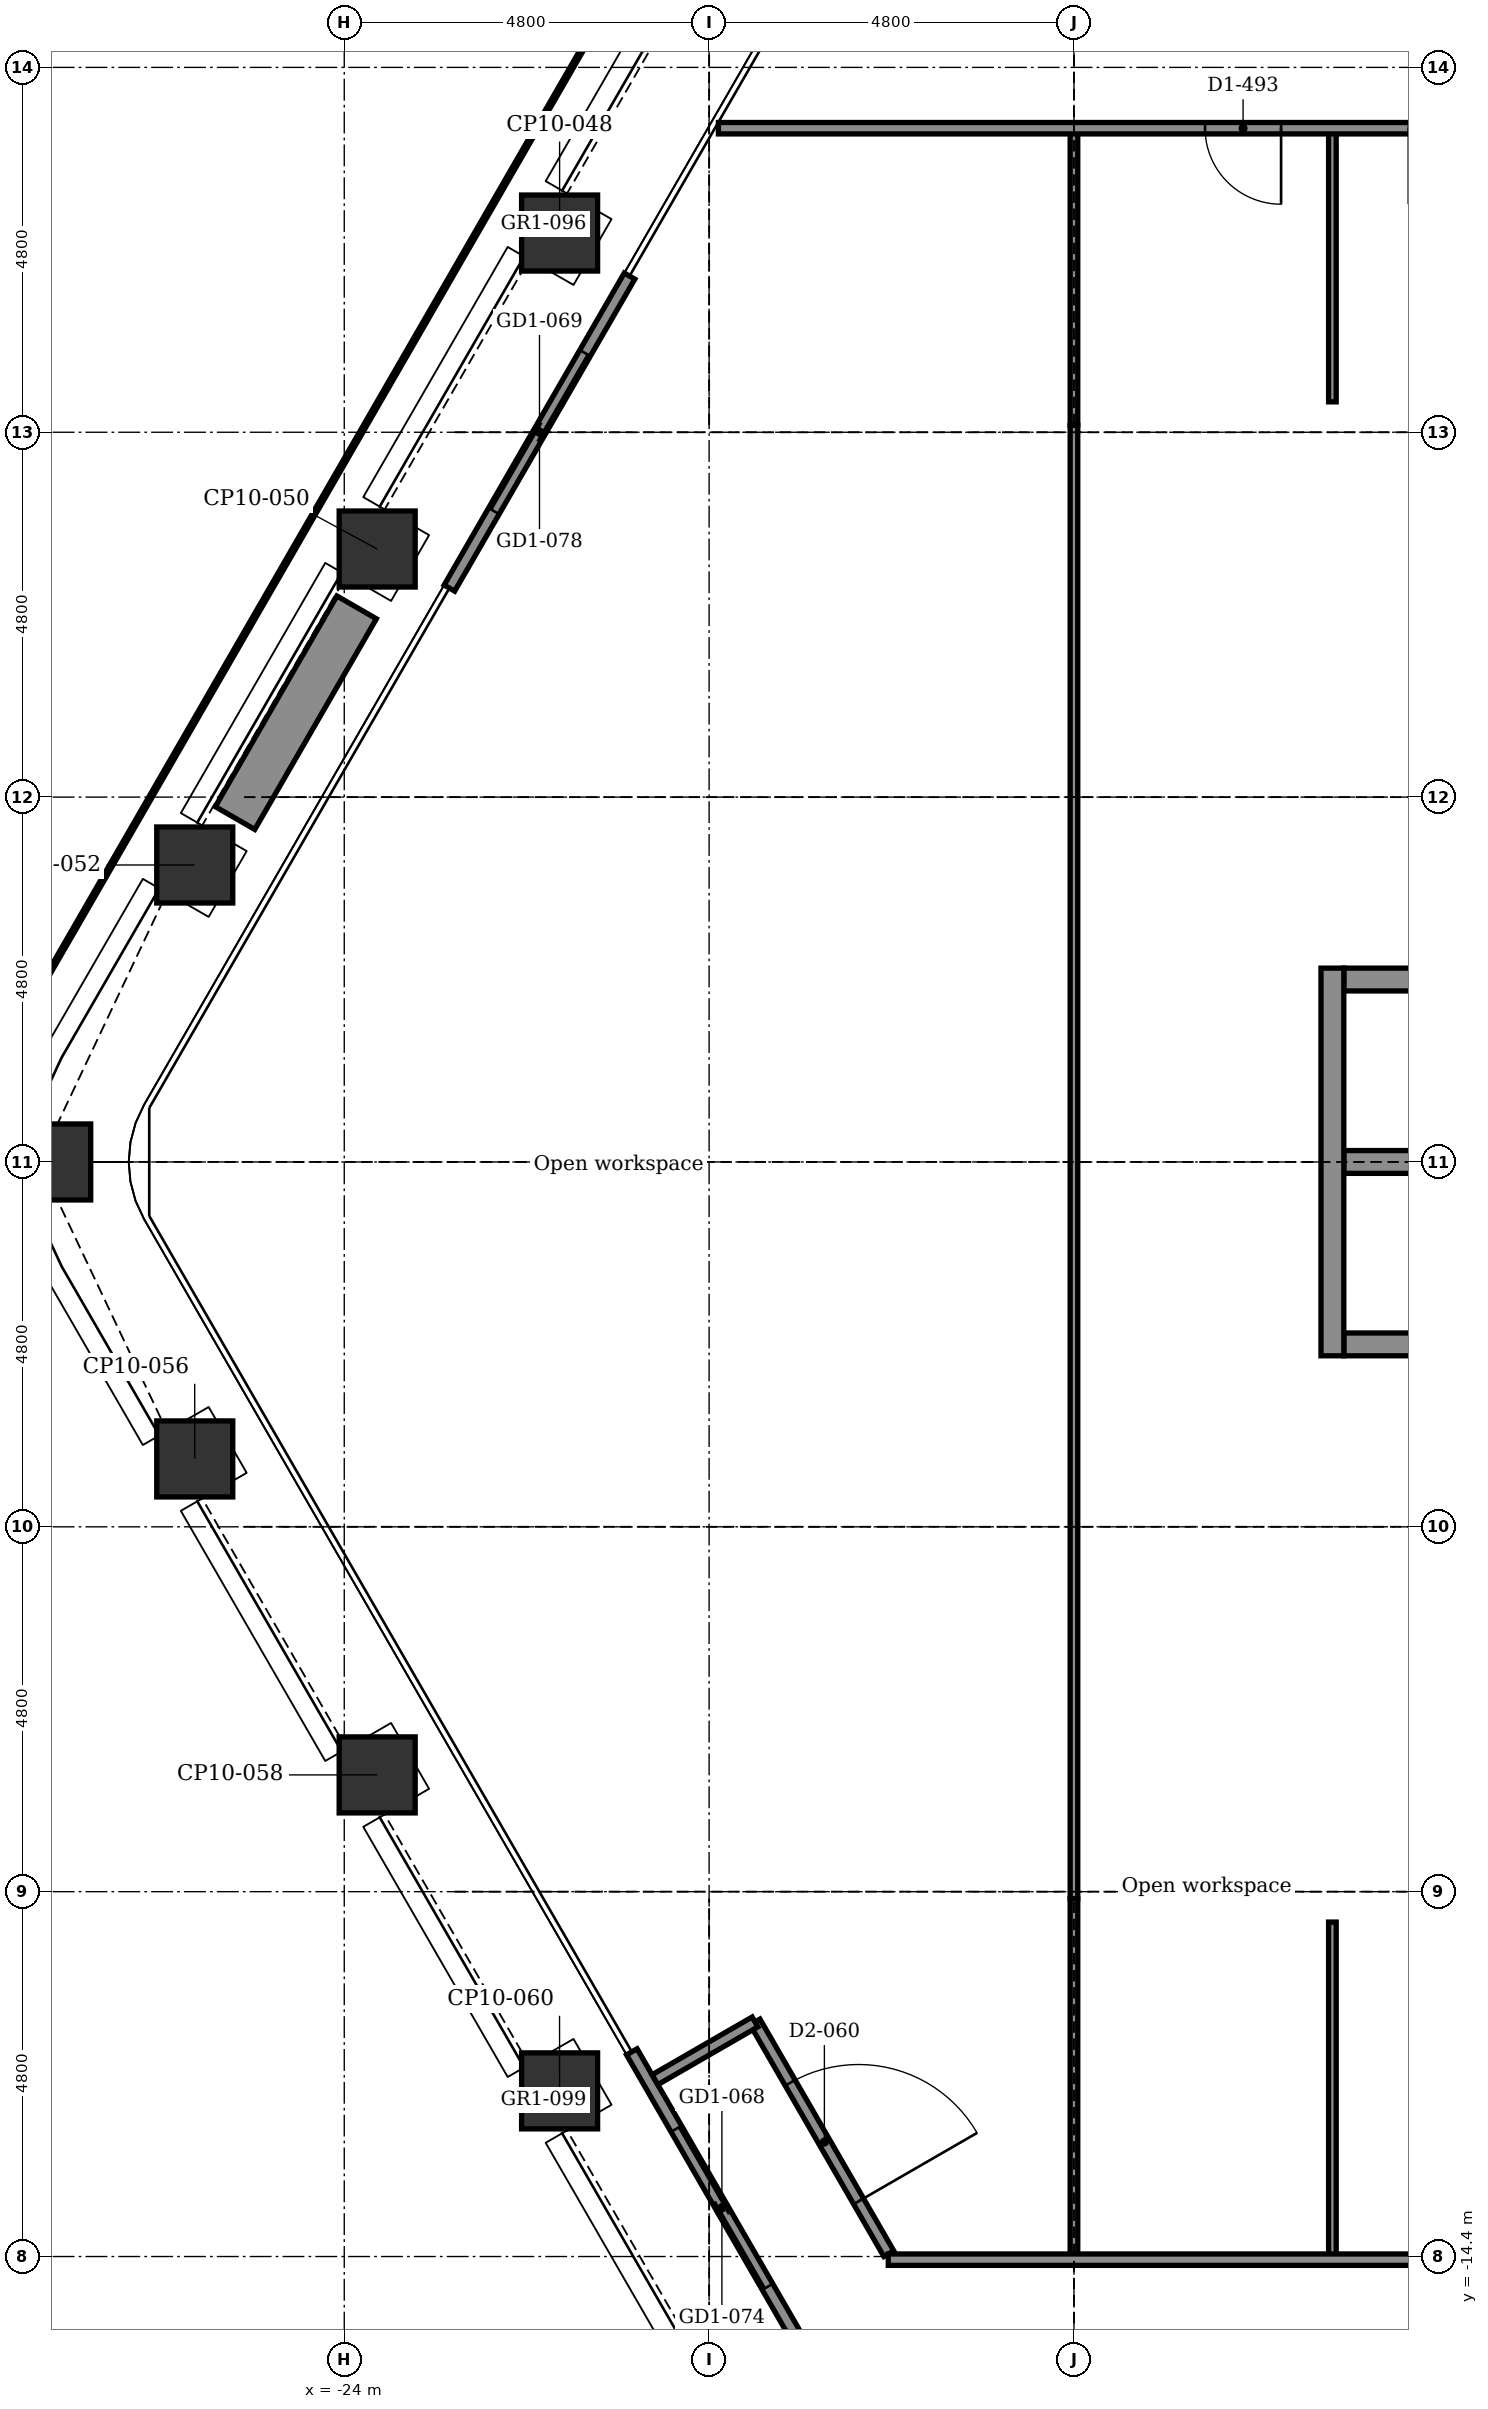
"""IFC4 building model, lengths in metres.
Left out: names, types, materials, properties, quantities, classifications, styles, units other than length and angle.
Written with IfcOpenShell. Run it as: python <this file> out.ifc"""

import sys

from ifc_helpers import new_model, si_unit, direction, frame, frame_2d, origin, origin_2d, place, context, subcontext, project, spatial, rectangle, extrude, element, fill, save


model = new_model("IFC4")
c1 = context("Model", 3, precision=1e-05, world=origin(), true_north=direction((0.0, 1.0)))
c2 = subcontext(c1, "Body", "Model", "MODEL_VIEW")
j1 = project(units=[si_unit("LENGTHUNIT", "METRE"), si_unit("PLANEANGLEUNIT", "RADIAN")], contexts=[c1])
p1 = place(None, origin())
s1 = spatial("IfcSite", under=j1, at=p1, CompositionType="ELEMENT")
p2 = place(p1, origin())
s2 = spatial("IfcBuilding", under=s1, at=p2, CompositionType="ELEMENT")
p3 = place(p2, frame((0.0, 0.0, 201.2)))
s3 = spatial("IfcBuildingStorey", under=s2, at=p3, CompositionType="ELEMENT", Elevation=201.2)
for number, where, z_axis, x_axis in (
    (1, (-21.167, -12.221, -0.15), (0.0, 0.0, 1.0), (0.866, 0.5, 0.0)),
    (2, (-23.567, -8.064, -0.15), (0.0, 0.0, 1.0), (0.866, 0.5, 0.0)),
    (3, (-25.967, -3.907, -0.15), (0.0, 0.0, 1.0), (0.866, 0.5, 0.0)),
    (4, (-27.836, 0.0, -0.15), (0.0, 0.0, 1.0), (1.0, 0.0, 0.0)),
    (5, (-25.967, 3.907, -0.15), (0.0, 0.0, 1.0), (0.5, 0.866, 0.0)),
    (6, (-23.567, 8.064, -0.15), (0.0, 0.0, 1.0), (0.5, 0.866, 0.0)),
    (7, (-21.167, 12.221, -0.15), (0.0, 0.0, 1.0), (0.5, 0.866, 0.0)),
):
    element("IfcColumn", number, at=place(p3, frame(where, z_axis=z_axis, x_axis=x_axis)), inside=s3, PredefinedType="COLUMN", context=c2, shape_type="SweptSolid", body=[
        extrude(rectangle(XDim=1.0, YDim=1.0, at=origin_2d()), origin(), (0.0, 0.0, 1.0), 3.9),
    ])
p4 = place(p3, frame((-10.85, -2.4, -0.15), z_axis=(0.0, 0.0, 1.0), x_axis=(1.0, 0.0, 0.0)))
e8 = element("IfcWall", 8, at=p4, inside=s3, PredefinedType="STANDARD", context=c2, shape_type="SweptSolid", body=[
    extrude(rectangle(XDim=1.1, YDim=0.3, at=frame_2d((0.55, 0.0))), origin(), (0.0, 0.0, 1.0), 3.9),
])
p5 = place(p3, frame((-10.85, 0.0, -0.15), z_axis=(0.0, 0.0, 1.0), x_axis=(1.0, 0.0, 0.0)))
e9 = element("IfcWall", 9, at=p5, inside=s3, PredefinedType="STANDARD", context=c2, shape_type="SweptSolid", body=[
    extrude(rectangle(XDim=3.3, YDim=0.3, at=frame_2d((1.65, 0.0))), origin(), (0.0, 0.0, 1.0), 3.9),
])
p6 = place(p3, frame((-10.85, 2.4, -0.15), z_axis=(0.0, 0.0, 1.0), x_axis=(1.0, 0.0, 0.0)))
e10 = element("IfcWall", 10, at=p6, inside=s3, PredefinedType="STANDARD", context=c2, shape_type="SweptSolid", body=[
    extrude(rectangle(XDim=1.1, YDim=0.3, at=frame_2d((0.55, 0.0))), origin(), (0.0, 0.0, 1.0), 3.9),
])
p7 = place(p3, frame((-11.0, -2.55, -0.15), z_axis=(0.0, 0.0, 1.0), x_axis=(0.0, 1.0, 0.0)))
e11 = element("IfcWall", 11, at=p7, inside=s3, PredefinedType="STANDARD", context=c2, shape_type="SweptSolid", body=[
    extrude(rectangle(XDim=5.1, YDim=0.3, at=frame_2d((2.55, 0.0))), origin(), (0.0, 0.0, 1.0), 3.9),
])
p8 = place(p3, frame((-17.847, -15.812, 0.0), z_axis=(0.0, 0.0, 1.0), x_axis=(-0.5000167099, 0.866015756104, 0.0)))
e12 = element("IfcWall", 12, at=p8, inside=s3, PredefinedType="PARTITIONING", context=c2, shape_type="SweptSolid", body=[
    extrude(rectangle(XDim=4.74, YDim=0.16, at=frame_2d((2.37, 0.0))), origin(), (0.0, 0.0, 1.0), 3.75),
])
p9 = place(p8, frame((1.17, 0.0, 0.0)))
e13 = element("IfcOpeningElement", 13, at=p9, cuts=e12, PredefinedType="OPENING", context=c2, shape_type="SweptSolid", body=[
    extrude(rectangle(XDim=2.4, YDim=2.4, at=frame_2d((1.2, 1.2))), frame((0.0, 0.09, 0.0), z_axis=(0.0, -1.0, 0.0), x_axis=(1.0, 0.0, 0.0)), (0.0, 0.0, 1.0), 0.18),
])
p10 = place(p3, frame((-22.617, 7.55, 0.0), z_axis=(0.0, 0.0, 1.0), x_axis=(0.5000167099, 0.866015756104, 0.0)))
e14 = element("IfcWall", 14, at=p10, inside=s3, PredefinedType="PARTITIONING", context=c2, shape_type="SweptSolid", body=[
    extrude(rectangle(XDim=4.74, YDim=0.16, at=frame_2d((2.37, 0.0))), origin(), (0.0, 0.0, 1.0), 3.75),
])
p11 = place(p10, frame((1.17, 0.0, 0.0)))
e15 = element("IfcOpeningElement", 15, at=p11, cuts=e14, PredefinedType="OPENING", context=c2, shape_type="SweptSolid", body=[
    extrude(rectangle(XDim=2.4, YDim=2.4, at=frame_2d((1.2, 1.2))), frame((0.0, 0.09, 0.0), z_axis=(0.0, -1.0, 0.0), x_axis=(1.0, 0.0, 0.0)), (0.0, 0.0, 1.0), 0.18),
])
p12 = place(p3, frame((-25.437, 4.525, 0.0), z_axis=(0.0, 0.0, 1.0), x_axis=(0.499938187974, 0.866061088033, 0.0)))
e16 = element("IfcWall", 16, at=p12, inside=s3, PredefinedType="USERDEFINED", context=c2, shape_type="SweptSolid", body=[
    extrude(rectangle(XDim=3.2, YDim=0.6, at=frame_2d((1.6, 0.0))), origin(), (0.0, 0.0, 1.0), 0.7),
])
p13 = place(p3, frame((-11.0, -14.441, 0.0), z_axis=(0.0, 0.0, 1.0), x_axis=(0.0, 1.0, 0.0)))
e17 = element("IfcWall", 17, at=p13, inside=s3, PredefinedType="PARTITIONING", context=c2, shape_type="SweptSolid", body=[
    extrude(rectangle(XDim=4.441, YDim=0.1, at=frame_2d((2.221, 0.0))), origin(), (0.0, 0.0, 1.0), 3.75),
])
p14 = place(p3, frame((-11.0, 10.0, 0.0), z_axis=(0.0, 0.0, 1.0), x_axis=(0.0, 1.0, 0.0)))
e18 = element("IfcWall", 18, at=p14, inside=s3, PredefinedType="PARTITIONING", context=c2, shape_type="SweptSolid", body=[
    extrude(rectangle(XDim=3.6, YDim=0.1, at=frame_2d((1.8, 0.0))), origin(), (0.0, 0.0, 1.0), 3.75),
])
p15 = place(p3, frame((-14.4, -9.694, 0.0), z_axis=(0.0, 0.0, 1.0), x_axis=(0.0, 1.0, 0.0)))
e19 = element("IfcWall", 19, at=p15, inside=s3, PredefinedType="PARTITIONING", context=c2, shape_type="SweptSolid", body=[
    extrude(rectangle(XDim=19.387, YDim=0.1, at=frame_2d((9.694, 0.0))), origin(), (0.0, 0.0, 1.0), 3.75),
])
p16 = place(p3, frame((-14.4, -14.441, 0.0), z_axis=(0.0, 0.0, 1.0), x_axis=(0.0, 1.0, 0.0)))
e20 = element("IfcWall", 20, at=p16, inside=s3, PredefinedType="PARTITIONING", context=c2, shape_type="SweptSolid", body=[
    extrude(rectangle(XDim=4.748, YDim=0.1, at=frame_2d((2.374, 0.0))), origin(), (0.0, 0.0, 1.0), 3.066),
])
p17 = place(p3, frame((-14.4, 9.694, 0.0), z_axis=(0.0, 0.0, 1.0), x_axis=(0.0, 1.0, 0.0)))
e21 = element("IfcWall", 21, at=p17, inside=s3, PredefinedType="PARTITIONING", context=c2, shape_type="SweptSolid", body=[
    extrude(rectangle(XDim=3.906, YDim=0.1, at=frame_2d((1.953, 0.0))), origin(), (0.0, 0.0, 1.0), 3.066),
])
p18 = place(p3, frame((-18.596, -11.314, 0.0), z_axis=(0.0, 0.0, 1.0), x_axis=(0.499980607609, -0.866036599697, 0.0)))
e22 = element("IfcWall", 22, at=p18, inside=s3, PredefinedType="PARTITIONING", context=c2, shape_type="SweptSolid", body=[
    extrude(rectangle(XDim=3.52, YDim=0.15, at=frame_2d((1.76, 0.0))), origin(), (0.0, 0.0, 1.0), 3.75),
])
p19 = place(p18, frame((0.925, 0.0, 0.0)))
e23 = element("IfcOpeningElement", 23, at=p19, cuts=e22, PredefinedType="OPENING", context=c2, shape_type="SweptSolid", body=[
    extrude(rectangle(XDim=1.8, YDim=2.1, at=frame_2d((0.9, 1.05))), frame((0.0, 0.085, 0.0), z_axis=(0.0, -1.0, 0.0), x_axis=(1.0, 0.0, 0.0)), (0.0, 0.0, 1.0), 0.17),
])
p20 = place(p3, frame((-19.912, -12.074, 0.0), z_axis=(0.0, 0.0, 1.0), x_axis=(0.866030456496, 0.499991248344, 0.0)))
e24 = element("IfcWall", 24, at=p20, inside=s3, PredefinedType="PARTITIONING", context=c2, shape_type="SweptSolid", body=[
    extrude(rectangle(XDim=1.52, YDim=0.15, at=frame_2d((0.76, 0.0))), origin(), (0.0, 0.0, 1.0), 3.75),
])
p21 = place(p3, frame((-16.843, -14.441, 0.0), z_axis=(0.0, 0.0, 1.0), x_axis=(1.0, 0.0, 0.0)))
e25 = element("IfcWall", 25, at=p21, inside=s3, PredefinedType="PARTITIONING", context=c2, shape_type="SweptSolid", body=[
    extrude(rectangle(XDim=19.843, YDim=0.15, at=frame_2d((9.921, 0.0))), origin(), (0.0, 0.0, 1.0), 3.75),
])
p22 = place(p21, frame((8.493, 0.0, 0.0)))
e26 = element("IfcOpeningElement", 26, at=p22, cuts=e25, PredefinedType="OPENING", context=c2, shape_type="SweptSolid", body=[
    extrude(rectangle(XDim=0.9, YDim=2.1, at=frame_2d((0.45, 1.05))), frame((0.0, 0.085, 0.0), z_axis=(0.0, -1.0, 0.0), x_axis=(1.0, 0.0, 0.0)), (0.0, 0.0, 1.0), 0.17),
])
p23 = place(p21, frame((13.993, 0.0, 0.0)))
e27 = element("IfcOpeningElement", 27, at=p23, cuts=e25, PredefinedType="OPENING", context=c2, shape_type="SweptSolid", body=[
    extrude(rectangle(XDim=0.9, YDim=2.1, at=frame_2d((0.45, 1.05))), frame((0.0, 0.085, 0.0), z_axis=(0.0, -1.0, 0.0), x_axis=(1.0, 0.0, 0.0)), (0.0, 0.0, 1.0), 0.17),
])
p24 = place(p3, frame((-19.077, 13.6, 0.0), z_axis=(0.0, 0.0, 1.0), x_axis=(1.0, 0.0, 0.0)))
e28 = element("IfcWall", 28, at=p24, inside=s3, PredefinedType="PARTITIONING", context=c2, shape_type="SweptSolid", body=[
    extrude(rectangle(XDim=13.677, YDim=0.15, at=frame_2d((6.839, 0.0))), origin(), (0.0, 0.0, 1.0), 3.75),
])
p25 = place(p24, frame((9.083, 0.0, 0.0)))
e29 = element("IfcOpeningElement", 29, at=p25, cuts=e28, PredefinedType="OPENING", context=c2, shape_type="SweptSolid", body=[
    extrude(rectangle(XDim=1.0, YDim=2.1, at=frame_2d((0.5, 1.05))), frame((0.0, 0.085, 0.0), z_axis=(0.0, -1.0, 0.0), x_axis=(1.0, 0.0, 0.0)), (0.0, 0.0, 1.0), 0.17),
])
p26 = place(p24, frame((6.402, 0.0, 0.0)))
e30 = element("IfcOpeningElement", 30, at=p26, cuts=e28, PredefinedType="OPENING", context=c2, shape_type="SweptSolid", body=[
    extrude(rectangle(XDim=1.0, YDim=2.1, at=frame_2d((0.5, 1.05))), frame((0.0, 0.085, 0.0), z_axis=(0.0, -1.0, 0.0), x_axis=(1.0, 0.0, 0.0)), (0.0, 0.0, 1.0), 0.17),
])
p27 = place(p9, origin())
e31 = element("IfcDoor", 31, at=p27, inside=s3, OperationType="DOUBLE_DOOR_SLIDING", PredefinedType="DOOR", context=c2, shape_type="SweptSolid", body=[
    extrude(rectangle(XDim=2.4, YDim=2.4, at=frame_2d((1.2, 1.2))), frame((0.0, 0.025, 0.0), z_axis=(0.0, -1.0, 0.0), x_axis=(1.0, 0.0, 0.0)), (0.0, 0.0, 1.0), 0.05),
])
fill(e13, e31)
p28 = place(p11, origin())
e32 = element("IfcDoor", 32, at=p28, inside=s3, OperationType="DOUBLE_DOOR_SLIDING", PredefinedType="DOOR", context=c2, shape_type="SweptSolid", body=[
    extrude(rectangle(XDim=2.4, YDim=2.4, at=frame_2d((1.2, 1.2))), frame((0.0, 0.025, 0.0), z_axis=(0.0, -1.0, 0.0), x_axis=(1.0, 0.0, 0.0)), (0.0, 0.0, 1.0), 0.05),
])
fill(e15, e32)
p29 = place(p19, origin())
e33 = element("IfcDoor", 33, at=p29, inside=s3, OperationType="SINGLE_SWING_RIGHT", PredefinedType="DOOR", context=c2, shape_type="SweptSolid", body=[
    extrude(rectangle(XDim=1.8, YDim=2.1, at=frame_2d((0.9, 1.05))), frame((0.0, 0.025, 0.0), z_axis=(0.0, -1.0, 0.0), x_axis=(1.0, 0.0, 0.0)), (0.0, 0.0, 1.0), 0.05),
])
fill(e23, e33)
p30 = place(p26, frame((1.0, 0.0, 0.0), z_axis=(0.0, 0.0, 1.0), x_axis=(-1.0, 0.0, 0.0)))
e34 = element("IfcDoor", 34, at=p30, inside=s3, OperationType="SINGLE_SWING_RIGHT", PredefinedType="DOOR", context=c2, shape_type="SweptSolid", body=[
    extrude(rectangle(XDim=1.0, YDim=2.1, at=frame_2d((0.5, 1.05))), frame((0.0, 0.025, 0.0), z_axis=(0.0, -1.0, 0.0), x_axis=(1.0, 0.0, 0.0)), (0.0, 0.0, 1.0), 0.05),
])
fill(e30, e34)
save(model, sys.argv[1])
